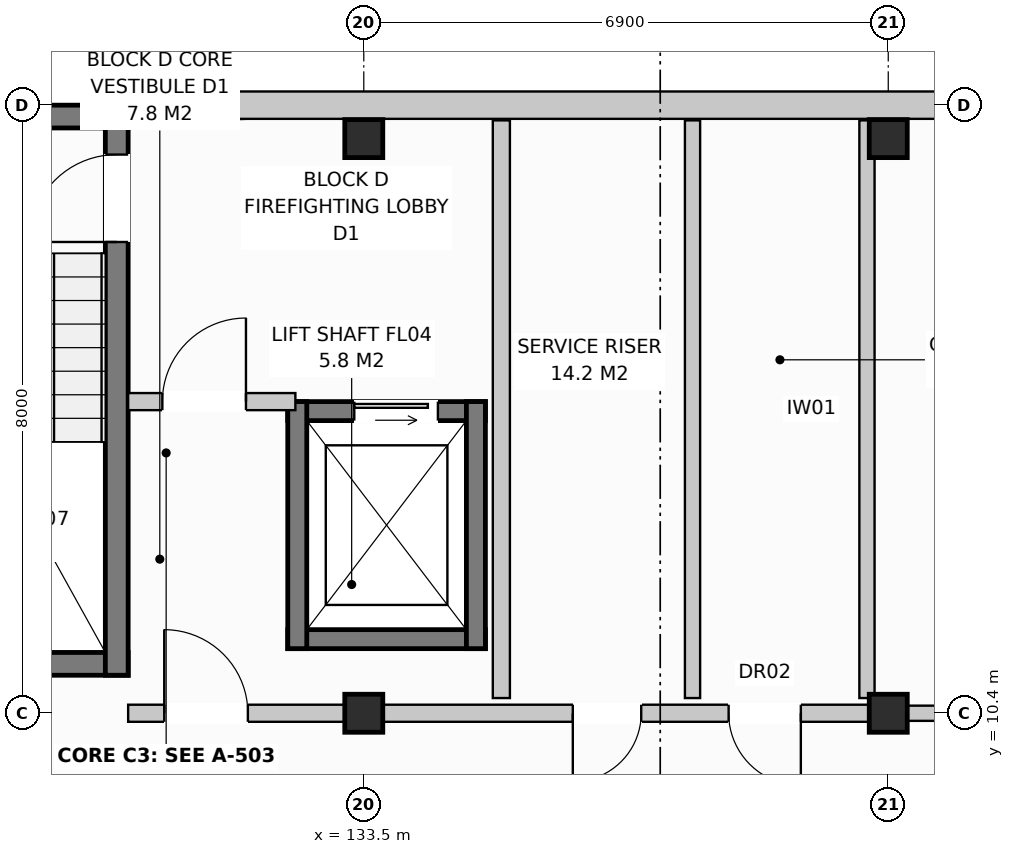
"""IFC4 building model, lengths in metres.
Left out: names, types, materials, properties, quantities, classifications, styles, units other than length and angle.
Written with IfcOpenShell. Run it as: python <this file> out.ifc"""

import sys

from ifc_helpers import new_model, si_unit, direction, frame, frame_2d, origin, origin_with_axes, origin_2d, place, context, subcontext, project, spatial, rectangle, extrude, element, fill, save


model = new_model("IFC4")
c1 = context("Model", 3, precision=1e-05, world=origin(), true_north=direction((0.0, 1.0)))
c2 = subcontext(c1, "Body", "Model", "MODEL_VIEW")
j1 = project(units=[si_unit("LENGTHUNIT", "METRE"), si_unit("PLANEANGLEUNIT", "RADIAN")], contexts=[c1])
p1 = place(None, origin())
s1 = spatial("IfcSite", under=j1, at=p1, CompositionType="ELEMENT")
p2 = place(p1, origin())
s2 = spatial("IfcBuilding", under=s1, at=p2, CompositionType="ELEMENT")
p3 = place(p2, frame((0.0, 0.0, 8.0)))
s3 = spatial("IfcBuildingStorey", under=s2, at=p3, CompositionType="ELEMENT", Elevation=8.0)
for number, where, z_axis, x_axis in (
    (1, (133.5, 10.4, 0.0), (0.0, 0.0, 1.0), (1.0, 0.0, 0.0)),
    (2, (133.5, 17.96, 0.0), (0.0, 0.0, 1.0), (1.0, 0.0, 0.0)),
    (3, (140.4, 10.4, 0.0), (0.0, 0.0, 1.0), (1.0, 0.0, 0.0)),
    (4, (140.4, 17.96, 0.0), (0.0, 0.0, 1.0), (1.0, 0.0, 0.0)),
):
    element("IfcColumn", number, at=place(p3, frame(where, z_axis=z_axis, x_axis=x_axis)), inside=s3, PredefinedType="COLUMN", context=c2, shape_type="SweptSolid", body=[
        extrude(rectangle(XDim=0.5, YDim=0.5, at=origin_2d()), origin(), (0.0, 0.0, 1.0), 3.2),
    ])
p4 = place(p3, frame((130.25, 18.4, 0.0), z_axis=(0.0, 0.0, 1.0), x_axis=(1.0, 0.0, 0.0)))
e5 = element("IfcWall", 5, at=p4, inside=s3, PredefinedType="STANDARD", context=c2, shape_type="SweptSolid", body=[
    extrude(rectangle(XDim=17.5, YDim=0.36, at=frame_2d((8.75, 0.0))), origin(), (0.0, 0.0, 1.0), 2.94),
])
p5 = place(p4, frame((11.966, 0.0, 0.0)))
e6 = element("IfcOpeningElement", 6, at=p5, cuts=e5, PredefinedType="OPENING", context=c2, shape_type="SweptSolid", body=[
    extrude(rectangle(XDim=0.95, YDim=2.1, at=frame_2d((0.475, 1.05))), frame((0.0, 0.192, 0.0), z_axis=(0.0, -1.0, 0.0), x_axis=(1.0, 0.0, 0.0)), (0.0, 0.0, 1.0), 0.384),
])
p6 = place(p4, frame((14.97, 0.0, 0.72)))
e7 = element("IfcOpeningElement", 7, at=p6, cuts=e5, PredefinedType="OPENING", context=c2, shape_type="SweptSolid", body=[
    extrude(rectangle(XDim=1.1, YDim=1.5, at=frame_2d((0.55, 0.75))), frame((0.0, 0.192, 0.0), z_axis=(0.0, -1.0, 0.0), x_axis=(1.0, 0.0, 0.0)), (0.0, 0.0, 1.0), 0.384),
])
for number, where, z_axis, x_axis in (
    (8, (126.9, 18.25, 0.0), (0.0, 0.0, 1.0), (1.0, 0.0, 0.0)),
    (9, (126.9, 11.05, 0.0), (0.0, 0.0, 1.0), (1.0, 0.0, 0.0)),
):
    element("IfcWall", number, at=place(p3, frame(where, z_axis=z_axis, x_axis=x_axis)), inside=s3, PredefinedType="SHEAR", context=c2, shape_type="SweptSolid", body=[
        extrude(rectangle(XDim=3.5, YDim=0.3, at=frame_2d((1.75, 0.0))), origin(), (0.0, 0.0, 1.0), 2.94),
    ])
p7 = place(p3, frame((130.25, 10.9, 0.0), z_axis=(0.0, 0.0, 1.0), x_axis=(0.0, 1.0, 0.0)))
e10 = element("IfcWall", 10, at=p7, inside=s3, PredefinedType="SHEAR", context=c2, shape_type="SweptSolid", body=[
    extrude(rectangle(XDim=7.5, YDim=0.3, at=frame_2d((3.75, 0.0))), origin(), (0.0, 0.0, 1.0), 2.94),
])
p8 = place(p7, frame((5.7, 0.0, 0.0)))
e11 = element("IfcOpeningElement", 11, at=p8, cuts=e10, PredefinedType="OPENING", context=c2, shape_type="SweptSolid", body=[
    extrude(rectangle(XDim=1.15, YDim=2.15, at=frame_2d((0.575, 1.075))), frame((0.0, 0.162, 0.0), z_axis=(0.0, -1.0, 0.0), x_axis=(1.0, 0.0, 0.0)), (0.0, 0.0, 1.0), 0.324),
])
p9 = place(p3, frame((132.5, 14.375, 0.0), z_axis=(0.0, 0.0, 1.0), x_axis=(1.0, 0.0, 0.0)))
e12 = element("IfcWall", 12, at=p9, inside=s3, PredefinedType="SHEAR", context=c2, shape_type="SweptSolid", body=[
    extrude(rectangle(XDim=2.6, YDim=0.25, at=frame_2d((1.3, 0.0))), origin(), (0.0, 0.0, 1.0), 2.94),
])
p10 = place(p9, frame((0.875, 0.0, 0.0)))
e13 = element("IfcOpeningElement", 13, at=p10, cuts=e12, PredefinedType="OPENING", context=c2, shape_type="SweptSolid", body=[
    extrude(rectangle(XDim=1.1, YDim=2.1, at=frame_2d((0.55, 1.05))), frame((0.0, 0.137, 0.0), z_axis=(0.0, -1.0, 0.0), x_axis=(1.0, 0.0, 0.0)), (0.0, 0.0, 1.0), 0.274),
])
p11 = place(p3, frame((132.5, 11.375, 0.0), z_axis=(0.0, 0.0, 1.0), x_axis=(1.0, 0.0, 0.0)))
e14 = element("IfcWall", 14, at=p11, inside=s3, PredefinedType="SHEAR", context=c2, shape_type="SweptSolid", body=[
    extrude(rectangle(XDim=2.6, YDim=0.25, at=frame_2d((1.3, 0.0))), origin(), (0.0, 0.0, 1.0), 2.94),
])
for number, where, z_axis, x_axis in (
    (15, (132.625, 11.25, 0.0), (0.0, 0.0, 1.0), (0.0, 1.0, 0.0)),
    (16, (134.975, 11.25, 0.0), (0.0, 0.0, 1.0), (0.0, 1.0, 0.0)),
):
    element("IfcWall", number, at=place(p3, frame(where, z_axis=z_axis, x_axis=x_axis)), inside=s3, PredefinedType="SHEAR", context=c2, shape_type="SweptSolid", body=[
        extrude(rectangle(XDim=3.25, YDim=0.25, at=frame_2d((1.625, 0.0))), origin(), (0.0, 0.0, 1.0), 2.94),
    ])
p12 = place(p3, frame((135.31, 10.6, 0.0), z_axis=(0.0, 0.0, 1.0), x_axis=(0.0, 1.0, 0.0)))
e17 = element("IfcWall", 17, at=p12, inside=s3, PredefinedType="PARTITIONING", context=c2, shape_type="SweptSolid", body=[
    extrude(rectangle(XDim=7.6, YDim=0.225, at=frame_2d((3.8, 0.0))), origin(), (0.0, 0.0, 1.0), 2.59),
])
p13 = place(p3, frame((130.4, 14.5, 0.0), z_axis=(0.0, 0.0, 1.0), x_axis=(1.0, 0.0, 0.0)))
e18 = element("IfcWall", 18, at=p13, inside=s3, PredefinedType="PARTITIONING", context=c2, shape_type="SweptSolid", body=[
    extrude(rectangle(XDim=2.2, YDim=0.225, at=frame_2d((1.1, 0.0))), origin(), (0.0, 0.0, 1.0), 2.94),
])
p14 = place(p13, frame((0.45, 0.0, 0.0)))
e19 = element("IfcOpeningElement", 19, at=p14, cuts=e18, PredefinedType="OPENING", context=c2, shape_type="SweptSolid", body=[
    extrude(rectangle(XDim=1.1, YDim=2.15, at=frame_2d((0.55, 1.075))), frame((0.0, 0.125, 0.0), z_axis=(0.0, -1.0, 0.0), x_axis=(1.0, 0.0, 0.0)), (0.0, 0.0, 1.0), 0.249),
])
for number, where, z_axis, x_axis in (
    (20, (137.825, 10.6, 0.0), (0.0, 0.0, 1.0), (0.0, 1.0, 0.0)),
    (21, (140.12, 10.6, 0.0), (0.0, 0.0, 1.0), (0.0, 1.0, 0.0)),
):
    element("IfcWall", number, at=place(p3, frame(where, z_axis=z_axis, x_axis=x_axis)), inside=s3, PredefinedType="PARTITIONING", context=c2, shape_type="SweptSolid", body=[
        extrude(rectangle(XDim=7.6, YDim=0.2, at=frame_2d((3.8, 0.0))), origin(), (0.0, 0.0, 1.0), 2.94),
    ])
p15 = place(p3, frame((130.4, 10.4, 0.0), z_axis=(0.0, 0.0, 1.0), x_axis=(1.0, 0.0, 0.0)))
e22 = element("IfcWall", 22, at=p15, inside=s3, PredefinedType="PARTITIONING", context=c2, shape_type="SweptSolid", body=[
    extrude(rectangle(XDim=10.0, YDim=0.225, at=frame_2d((5.0, 0.0))), origin(), (0.0, 0.0, 1.0), 2.38),
])
p16 = place(p15, frame((0.475, 0.0, 0.0)))
e23 = element("IfcOpeningElement", 23, at=p16, cuts=e22, PredefinedType="OPENING", context=c2, shape_type="SweptSolid", body=[
    extrude(rectangle(XDim=1.1, YDim=2.15, at=frame_2d((0.55, 1.075))), frame((0.0, 0.125, 0.0), z_axis=(0.0, -1.0, 0.0), x_axis=(1.0, 0.0, 0.0)), (0.0, 0.0, 1.0), 0.249),
])
p17 = place(p15, frame((5.85, 0.0, 0.0)))
e24 = element("IfcOpeningElement", 24, at=p17, cuts=e22, PredefinedType="OPENING", context=c2, shape_type="SweptSolid", body=[
    extrude(rectangle(XDim=0.9, YDim=2.1, at=frame_2d((0.45, 1.05))), frame((0.0, 0.125, 0.0), z_axis=(0.0, -1.0, 0.0), x_axis=(1.0, 0.0, 0.0)), (0.0, 0.0, 1.0), 0.249),
])
p18 = place(p15, frame((7.9, 0.0, 0.0)))
e25 = element("IfcOpeningElement", 25, at=p18, cuts=e22, PredefinedType="OPENING", context=c2, shape_type="SweptSolid", body=[
    extrude(rectangle(XDim=0.95, YDim=2.15, at=frame_2d((0.475, 1.075))), frame((0.0, 0.125, 0.0), z_axis=(0.0, -1.0, 0.0), x_axis=(1.0, 0.0, 0.0)), (0.0, 0.0, 1.0), 0.249),
])
p19 = place(p3, frame((140.4, 10.4, 0.0), z_axis=(0.0, 0.0, 1.0), x_axis=(1.0, 0.0, 0.0)))
e26 = element("IfcWall", 26, at=p19, inside=s3, PredefinedType="PARTITIONING", context=c2, shape_type="SweptSolid", body=[
    extrude(rectangle(XDim=6.9, YDim=0.2, at=frame_2d((3.45, 0.0))), origin(), (0.0, 0.0, 1.0), 2.38),
])
p20 = place(p19, frame((2.0, 0.0, 0.0)))
e27 = element("IfcOpeningElement", 27, at=p20, cuts=e26, PredefinedType="OPENING", context=c2, shape_type="SweptSolid", body=[
    extrude(rectangle(XDim=0.95, YDim=2.15, at=frame_2d((0.475, 1.075))), frame((0.0, 0.112, 0.0), z_axis=(0.0, -1.0, 0.0), x_axis=(1.0, 0.0, 0.0)), (0.0, 0.0, 1.0), 0.224),
])
p21 = place(p8, origin_with_axes())
e28 = element("IfcDoor", 28, at=p21, inside=s3, OperationType="SINGLE_SWING_LEFT", PredefinedType="DOOR", context=c2, shape_type="SweptSolid", body=[
    extrude(rectangle(XDim=1.15, YDim=2.15, at=frame_2d((0.575, 1.075))), frame((0.0, 0.025, 0.0), z_axis=(0.0, -1.0, 0.0), x_axis=(1.0, 0.0, 0.0)), (0.0, 0.0, 1.0), 0.05),
])
fill(e11, e28)
p22 = place(p10, origin_with_axes())
e29 = element("IfcDoor", 29, at=p22, inside=s3, OperationType="SLIDING_TO_LEFT", PredefinedType="DOOR", context=c2, shape_type="SweptSolid", body=[
    extrude(rectangle(XDim=1.1, YDim=2.1, at=frame_2d((0.55, 1.05))), frame((0.0, 0.025, 0.0), z_axis=(0.0, -1.0, 0.0), x_axis=(1.0, 0.0, 0.0)), (0.0, 0.0, 1.0), 0.05),
])
fill(e13, e29)
p23 = place(p14, origin_with_axes())
e30 = element("IfcDoor", 30, at=p23, inside=s3, OperationType="SINGLE_SWING_RIGHT", PredefinedType="DOOR", context=c2, shape_type="SweptSolid", body=[
    extrude(rectangle(XDim=1.1, YDim=2.15, at=frame_2d((0.55, 1.075))), frame((0.0, 0.025, 0.0), z_axis=(0.0, -1.0, 0.0), x_axis=(1.0, 0.0, 0.0)), (0.0, 0.0, 1.0), 0.05),
])
fill(e19, e30)
p24 = place(p16, origin_with_axes())
e31 = element("IfcDoor", 31, at=p24, inside=s3, OperationType="SINGLE_SWING_LEFT", PredefinedType="DOOR", context=c2, shape_type="SweptSolid", body=[
    extrude(rectangle(XDim=1.1, YDim=2.15, at=frame_2d((0.55, 1.075))), frame((0.0, 0.025, 0.0), z_axis=(0.0, -1.0, 0.0), x_axis=(1.0, 0.0, 0.0)), (0.0, 0.0, 1.0), 0.05),
])
fill(e23, e31)
p25 = place(p17, frame((0.9, 0.0, 0.0), z_axis=(0.0, 0.0, 1.0), x_axis=(-1.0, 0.0, 0.0)))
e32 = element("IfcDoor", 32, at=p25, inside=s3, OperationType="SINGLE_SWING_LEFT", PredefinedType="DOOR", context=c2, shape_type="SweptSolid", body=[
    extrude(rectangle(XDim=0.9, YDim=2.1, at=frame_2d((0.45, 1.05))), frame((0.0, 0.025, 0.0), z_axis=(0.0, -1.0, 0.0), x_axis=(1.0, 0.0, 0.0)), (0.0, 0.0, 1.0), 0.05),
])
fill(e24, e32)
p26 = place(p18, frame((0.95, 0.0, 0.0), z_axis=(0.0, 0.0, 1.0), x_axis=(-1.0, 0.0, 0.0)))
e33 = element("IfcDoor", 33, at=p26, inside=s3, OperationType="SINGLE_SWING_RIGHT", PredefinedType="DOOR", context=c2, shape_type="SweptSolid", body=[
    extrude(rectangle(XDim=0.95, YDim=2.15, at=frame_2d((0.475, 1.075))), frame((0.0, 0.025, 0.0), z_axis=(0.0, -1.0, 0.0), x_axis=(1.0, 0.0, 0.0)), (0.0, 0.0, 1.0), 0.05),
])
fill(e25, e33)
save(model, sys.argv[1])
